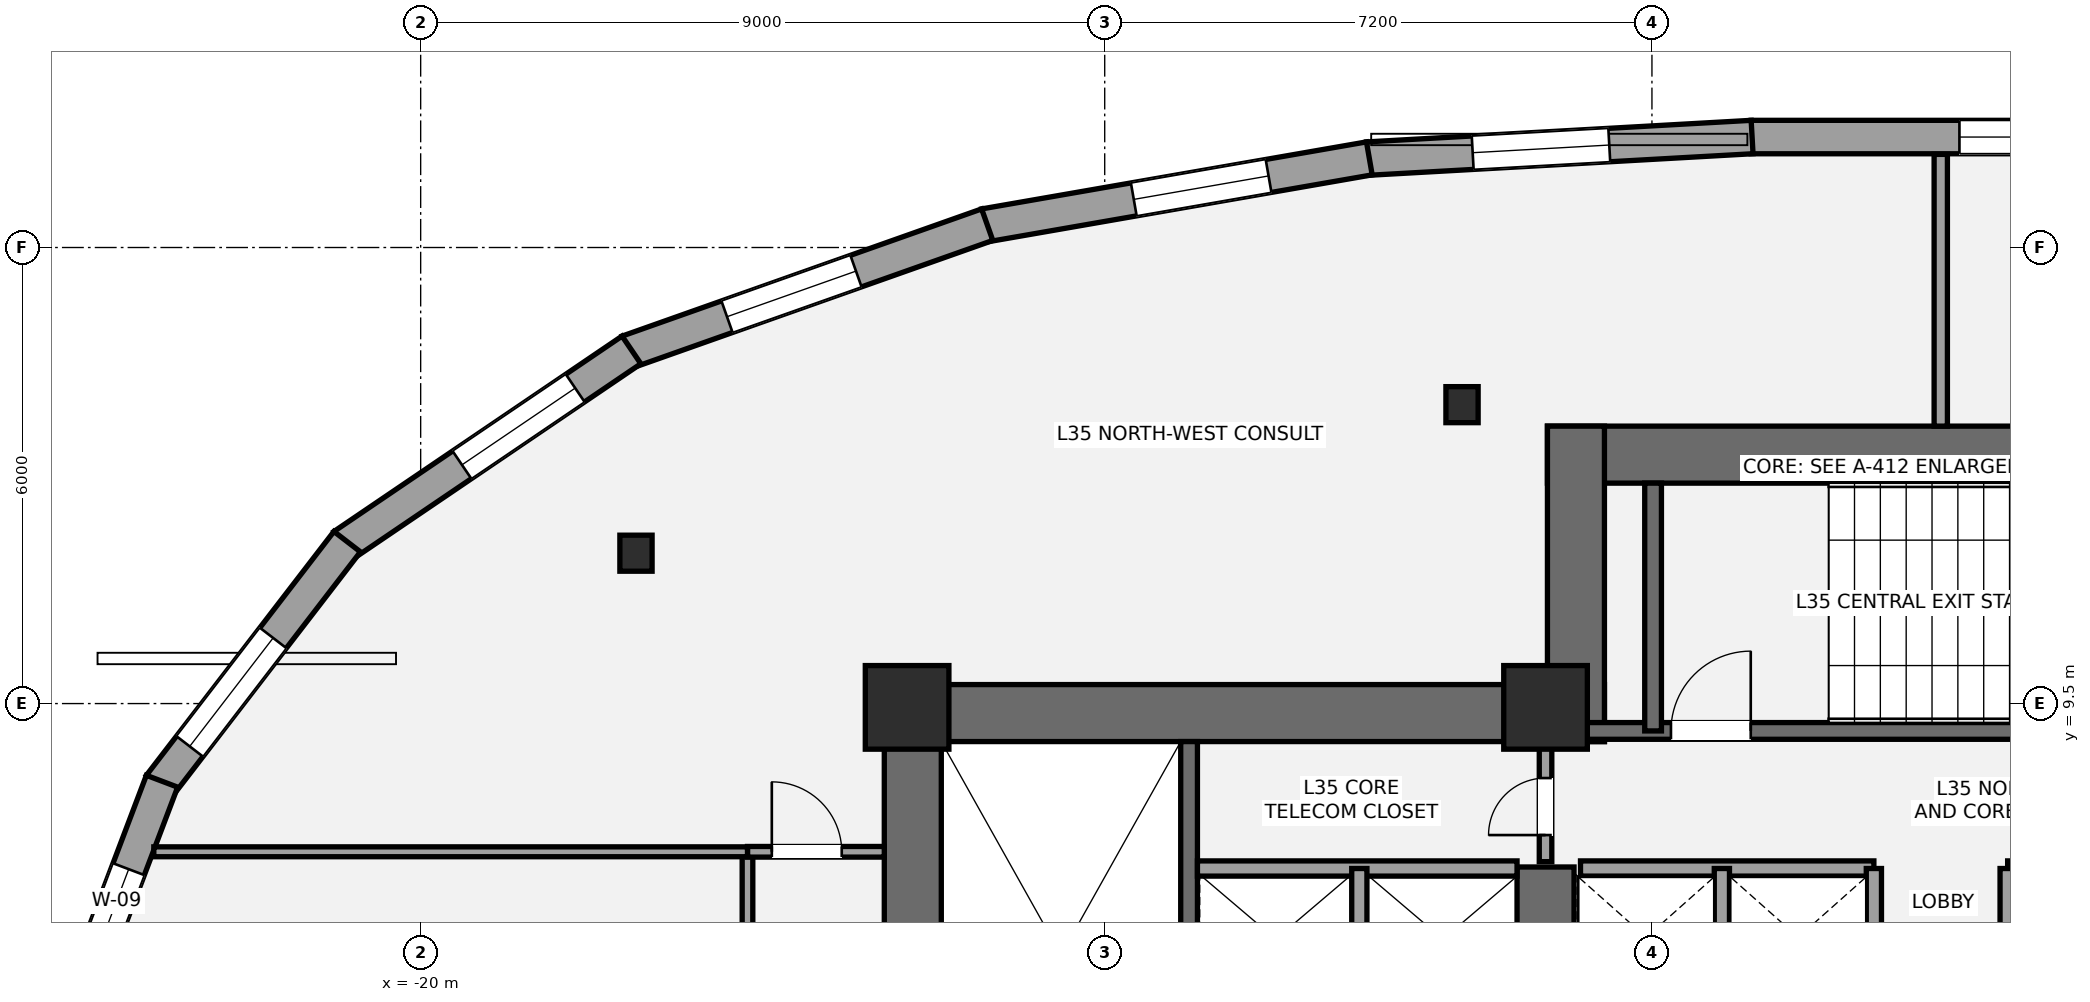
"""IFC4 building model, lengths in metres.
Left out: names, types, materials, properties, quantities, classifications, styles, units other than length and angle.
Written with IfcOpenShell. Run it as: python <this file> out.ifc"""

import sys

from ifc_helpers import new_model, si_unit, direction, frame, frame_2d, origin, origin_2d, place, context, subcontext, project, spatial, rectangle, i_section, extrude, element, fill, save


model = new_model("IFC4")
c1 = context("Model", 3, precision=1e-05, world=origin(), true_north=direction((0.0, 1.0)))
c2 = subcontext(c1, "Body", "Model", "MODEL_VIEW")
j1 = project(units=[si_unit("LENGTHUNIT", "METRE"), si_unit("PLANEANGLEUNIT", "RADIAN")], contexts=[c1])
p1 = place(None, origin())
s1 = spatial("IfcSite", under=j1, at=p1, CompositionType="ELEMENT")
p2 = place(p1, origin())
s2 = spatial("IfcBuilding", under=s1, at=p2, CompositionType="ELEMENT")
p3 = place(p2, frame((0.0, 0.0, 131.6)))
s3 = spatial("IfcBuildingStorey", under=s2, at=p3, CompositionType="ELEMENT", Elevation=131.6)
p4 = place(p3, frame((-13.525, 1.1, 0.0), z_axis=(0.0, 0.0, 1.0), x_axis=(0.0, 1.0, 0.0)))
e1 = element("IfcWall", 1, at=p4, inside=s3, PredefinedType="SHEAR", context=c2, shape_type="SweptSolid", body=[
    extrude(rectangle(XDim=8.65, YDim=0.75, at=frame_2d((4.325, 0.0))), origin(), (0.0, 0.0, 1.0), 3.5),
])
p5 = place(p3, frame((-13.9, 9.375, 0.0), z_axis=(0.0, 0.0, 1.0), x_axis=(1.0, 0.0, 0.0)))
e2 = element("IfcWall", 2, at=p5, inside=s3, PredefinedType="SHEAR", context=c2, shape_type="SweptSolid", body=[
    extrude(rectangle(XDim=9.475, YDim=0.75, at=frame_2d((4.737, 0.0))), origin(), (0.0, 0.0, 1.0), 3.5),
])
p6 = place(p3, frame((-5.2, 5.35, 0.0), z_axis=(0.0, 0.0, 1.0), x_axis=(0.0, 1.0, 0.0)))
e3 = element("IfcWall", 3, at=p6, inside=s3, PredefinedType="SHEAR", context=c2, shape_type="SweptSolid", body=[
    extrude(rectangle(XDim=2.0, YDim=0.75, at=frame_2d((1.0, 0.0))), origin(), (0.0, 0.0, 1.0), 3.5),
])
p7 = place(p3, frame((-9.89, 1.85, 0.0), z_axis=(0.0, 0.0, 1.0), x_axis=(0.0, 1.0, 0.0)))
e4 = element("IfcWall", 4, at=p7, inside=s3, PredefinedType="SHEAR", context=c2, shape_type="SweptSolid", body=[
    extrude(rectangle(XDim=7.15, YDim=0.22, at=frame_2d((3.575, 0.0))), origin(), (0.0, 0.0, 1.0), 3.5),
])
p8 = place(p3, frame((-5.175, 12.775, 0.0), z_axis=(0.0, 0.0, 1.0), x_axis=(1.0, 0.0, 0.0)))
e5 = element("IfcWall", 5, at=p8, inside=s3, PredefinedType="SHEAR", context=c2, shape_type="SweptSolid", body=[
    extrude(rectangle(XDim=10.35, YDim=0.75, at=frame_2d((5.175, 0.0))), origin(), (0.0, 0.0, 1.0), 3.5),
])
p9 = place(p3, frame((-4.8, 9.0, 0.0), z_axis=(0.0, 0.0, 1.0), x_axis=(0.0, 1.0, 0.0)))
e6 = element("IfcWall", 6, at=p9, inside=s3, PredefinedType="SHEAR", context=c2, shape_type="SweptSolid", body=[
    extrude(rectangle(XDim=4.15, YDim=0.75, at=frame_2d((2.075, 0.0))), origin(), (0.0, 0.0, 1.0), 3.5),
])
p10 = place(p3, frame((-4.7, 9.14, 0.0), z_axis=(0.0, 0.0, 1.0), x_axis=(1.0, 0.0, 0.0)))
e7 = element("IfcWall", 7, at=p10, inside=s3, PredefinedType="SHEAR", context=c2, shape_type="SweptSolid", body=[
    extrude(rectangle(XDim=9.3, YDim=0.22, at=frame_2d((4.65, 0.0))), origin(), (0.0, 0.0, 1.0), 3.5),
])
p11 = place(p10, frame((1.15, 0.0, 0.0)))
e8 = element("IfcOpeningElement", 8, at=p11, cuts=e7, PredefinedType="OPENING", context=c2, shape_type="SweptSolid", body=[
    extrude(rectangle(XDim=1.05, YDim=2.15, at=frame_2d((0.525, 1.075))), frame((0.0, 0.12, 0.0), z_axis=(0.0, -1.0, 0.0), x_axis=(1.0, 0.0, 0.0)), (0.0, 0.0, 1.0), 0.24),
])
p12 = place(p3, frame((-3.785, 9.14, 0.0), z_axis=(0.0, 0.0, 1.0), x_axis=(0.0, 1.0, 0.0)))
e9 = element("IfcWall", 9, at=p12, inside=s3, PredefinedType="SHEAR", context=c2, shape_type="SweptSolid", body=[
    extrude(rectangle(XDim=3.26, YDim=0.22, at=frame_2d((1.63, 0.0))), origin(), (0.0, 0.0, 1.0), 3.5),
])
for number, where, z_axis, x_axis in (
    (10, (-13.6, 9.45, 0.0), (0.0, 0.0, 1.0), (1.0, 0.0, 0.0)),
    (11, (-5.2, 9.45, 0.0), (0.0, 0.0, 1.0), (1.0, 0.0, 0.0)),
):
    element("IfcColumn", number, at=place(p3, frame(where, z_axis=z_axis, x_axis=x_axis)), inside=s3, PredefinedType="COLUMN", context=c2, shape_type="SweptSolid", body=[
        extrude(rectangle(XDim=1.1, YDim=1.1, at=origin_2d()), origin(), (0.0, 0.0, 1.0), 3.5),
    ])
for number, where, z_axis, x_axis in (
    (12, (-6.299, 13.433, 0.0), (0.0, 0.0, 1.0), (1.0, 0.0, 0.0)),
    (13, (-17.167, 11.478, 0.0), (0.0, 0.0, 1.0), (1.0, 0.0, 0.0)),
):
    element("IfcColumn", number, at=place(p3, frame(where, z_axis=z_axis, x_axis=x_axis)), inside=s3, PredefinedType="COLUMN", context=c2, shape_type="SweptSolid", body=[
        extrude(i_section(OverallWidth=0.424, OverallDepth=0.474, WebThickness=0.048, FlangeThickness=0.077, at=origin_2d()), origin(), (0.0, 0.0, 1.0), 3.5),
    ])
p13 = place(p3, frame((-2.495, 16.953, 0.0), z_axis=(0.0, 0.0, 1.0), x_axis=(1.0, 0.0, 0.0)))
e14 = element("IfcWall", 14, at=p13, inside=s3, PredefinedType="STANDARD", context=c2, shape_type="SweptSolid", body=[
    extrude(rectangle(XDim=4.989, YDim=0.44, at=frame_2d((2.495, 0.0))), origin(), (0.0, 0.0, 1.0), 2.482),
])
p14 = place(p13, frame((2.74, 0.0, 0.65)))
e15 = element("IfcOpeningElement", 15, at=p14, cuts=e14, PredefinedType="OPENING", context=c2, shape_type="SweptSolid", body=[
    extrude(rectangle(XDim=1.8, YDim=1.7, at=frame_2d((0.9, 0.85))), frame((0.0, 0.23, 0.0), z_axis=(0.0, -1.0, 0.0), x_axis=(1.0, 0.0, 0.0)), (0.0, 0.0, 1.0), 0.46),
])
p15 = place(p3, frame((-7.544, 16.669, 0.0), z_axis=(0.0, 0.0, 1.0), x_axis=(0.99842742965, 0.056059501621, 0.0)))
e16 = element("IfcWall", 16, at=p15, inside=s3, PredefinedType="STANDARD", context=c2, shape_type="SweptSolid", body=[
    extrude(rectangle(XDim=5.069, YDim=0.44, at=frame_2d((2.535, 0.0))), origin(), (0.0, 0.0, 1.0), 2.478),
])
p16 = place(p15, frame((1.387, 0.0, 0.65)))
e17 = element("IfcOpeningElement", 17, at=p16, cuts=e16, PredefinedType="OPENING", context=c2, shape_type="SweptSolid", body=[
    extrude(rectangle(XDim=1.8, YDim=1.7, at=frame_2d((0.9, 0.85))), frame((0.0, 0.23, 0.0), z_axis=(0.0, -1.0, 0.0), x_axis=(1.0, 0.0, 0.0)), (0.0, 0.0, 1.0), 0.46),
])
p17 = place(p3, frame((-12.582, 15.791, 0.0), z_axis=(0.0, 0.0, 1.0), x_axis=(0.985177916526, 0.171535631254, 0.0)))
e18 = element("IfcWall", 18, at=p17, inside=s3, PredefinedType="STANDARD", context=c2, shape_type="SweptSolid", body=[
    extrude(rectangle(XDim=5.139, YDim=0.44, at=frame_2d((2.57, 0.0))), origin(), (0.0, 0.0, 1.0), 2.478),
])
p18 = place(p17, frame((1.993, 0.0, 0.65)))
e19 = element("IfcOpeningElement", 19, at=p18, cuts=e18, PredefinedType="OPENING", context=c2, shape_type="SweptSolid", body=[
    extrude(rectangle(XDim=1.8, YDim=1.7, at=frame_2d((0.9, 0.85))), frame((0.0, 0.23, 0.0), z_axis=(0.0, -1.0, 0.0), x_axis=(1.0, 0.0, 0.0)), (0.0, 0.0, 1.0), 0.46),
])
p19 = place(p3, frame((-17.277, 14.127, 0.0), z_axis=(0.0, 0.0, 1.0), x_axis=(0.942780868171, 0.333413009061, 0.0)))
e20 = element("IfcWall", 20, at=p19, inside=s3, PredefinedType="STANDARD", context=c2, shape_type="SweptSolid", body=[
    extrude(rectangle(XDim=5.018, YDim=0.44, at=frame_2d((2.509, 0.0))), origin(), (0.0, 0.0, 1.0), 2.478),
])
p20 = place(p19, frame((1.387, 0.0, 0.65)))
e21 = element("IfcOpeningElement", 21, at=p20, cuts=e20, PredefinedType="OPENING", context=c2, shape_type="SweptSolid", body=[
    extrude(rectangle(XDim=1.8, YDim=1.7, at=frame_2d((0.9, 0.85))), frame((0.0, 0.23, 0.0), z_axis=(0.0, -1.0, 0.0), x_axis=(1.0, 0.0, 0.0)), (0.0, 0.0, 1.0), 0.46),
])
p21 = place(p3, frame((-21.018, 11.582, 0.0), z_axis=(0.0, 0.0, 1.0), x_axis=(0.827670311179, 0.561214625605, 0.0)))
e22 = element("IfcWall", 22, at=p21, inside=s3, PredefinedType="STANDARD", context=c2, shape_type="SweptSolid", body=[
    extrude(rectangle(XDim=4.58, YDim=0.44, at=frame_2d((2.29, 0.0))), origin(), (0.0, 0.0, 1.0), 2.482),
])
p22 = place(p21, frame((1.886, 0.0, 0.65)))
e23 = element("IfcOpeningElement", 23, at=p22, cuts=e22, PredefinedType="OPENING", context=c2, shape_type="SweptSolid", body=[
    extrude(rectangle(XDim=1.8, YDim=1.7, at=frame_2d((0.9, 0.85))), frame((0.0, 0.23, 0.0), z_axis=(0.0, -1.0, 0.0), x_axis=(1.0, 0.0, 0.0)), (0.0, 0.0, 1.0), 0.46),
])
p23 = place(p3, frame((-23.435, 8.422, 0.0), z_axis=(0.0, 0.0, 1.0), x_axis=(0.60975157382, 0.792592592839, 0.0)))
e24 = element("IfcWall", 24, at=p23, inside=s3, PredefinedType="STANDARD", context=c2, shape_type="SweptSolid", body=[
    extrude(rectangle(XDim=4.047, YDim=0.44, at=frame_2d((2.023, 0.0))), origin(), (0.0, 0.0, 1.0), 2.482),
])
p24 = place(p23, frame((0.649, 0.0, 0.65)))
e25 = element("IfcOpeningElement", 25, at=p24, cuts=e24, PredefinedType="OPENING", context=c2, shape_type="SweptSolid", body=[
    extrude(rectangle(XDim=1.8, YDim=1.7, at=frame_2d((0.9, 0.85))), frame((0.0, 0.23, 0.0), z_axis=(0.0, -1.0, 0.0), x_axis=(1.0, 0.0, 0.0)), (0.0, 0.0, 1.0), 0.46),
])
p25 = place(p3, frame((-24.704, 5.045, 0.0), z_axis=(0.0, 0.0, 1.0), x_axis=(0.354219131363, 0.935162449511, 0.0)))
e26 = element("IfcWall", 26, at=p25, inside=s3, PredefinedType="STANDARD", context=c2, shape_type="SweptSolid", body=[
    extrude(rectangle(XDim=3.671, YDim=0.44, at=frame_2d((1.835, 0.0))), origin(), (0.0, 0.0, 1.0), 2.478),
])
p26 = place(p25, frame((1.534, 0.0, 0.58)))
e27 = element("IfcOpeningElement", 27, at=p26, cuts=e26, PredefinedType="OPENING", context=c2, shape_type="SweptSolid", body=[
    extrude(rectangle(XDim=0.9, YDim=1.35, at=frame_2d((0.45, 0.675))), frame((0.0, 0.23, 0.0), z_axis=(0.0, -1.0, 0.0), x_axis=(1.0, 0.0, 0.0)), (0.0, 0.0, 1.0), 0.46),
])
p27 = place(p3, frame((-9.78, 7.33, 0.0), z_axis=(0.0, 0.0, 1.0), x_axis=(1.0, 0.0, 0.0)))
e28 = element("IfcWall", 28, at=p27, inside=s3, PredefinedType="SOLIDWALL", context=c2, shape_type="SweptSolid", body=[
    extrude(rectangle(XDim=4.205, YDim=0.2, at=frame_2d((2.103, 0.0))), origin(), (0.0, 0.0, 1.0), 3.26),
])
p28 = place(p3, frame((-7.65, 5.47, 0.0), z_axis=(0.0, 0.0, 1.0), x_axis=(0.0, 1.0, 0.0)))
e29 = element("IfcWall", 29, at=p28, inside=s3, PredefinedType="SOLIDWALL", context=c2, shape_type="SweptSolid", body=[
    extrude(rectangle(XDim=1.86, YDim=0.2, at=frame_2d((0.93, 0.0))), origin(), (0.0, 0.0, 1.0), 3.26),
])
for number, where, z_axis, x_axis in (
    (30, (-4.74, 7.33, 0.0), (0.0, 0.0, 1.0), (1.0, 0.0, 0.0)),
    (31, (0.88, 7.33, 0.0), (0.0, 0.0, 1.0), (1.0, 0.0, 0.0)),
):
    element("IfcWall", number, at=place(p3, frame(where, z_axis=z_axis, x_axis=x_axis)), inside=s3, PredefinedType="SOLIDWALL", context=c2, shape_type="SweptSolid", body=[
        extrude(rectangle(XDim=3.86, YDim=0.2, at=frame_2d((1.93, 0.0))), origin(), (0.0, 0.0, 1.0), 3.26),
    ])
for number, where, z_axis, x_axis in (
    (32, (-2.88, 5.52, 0.0), (0.0, 0.0, 1.0), (0.0, 1.0, 0.0)),
    (33, (-0.88, 5.52, 0.0), (0.0, 0.0, 1.0), (0.0, 1.0, 0.0)),
    (34, (0.88, 5.52, 0.0), (0.0, 0.0, 1.0), (0.0, 1.0, 0.0)),
):
    element("IfcWall", number, at=place(p3, frame(where, z_axis=z_axis, x_axis=x_axis)), inside=s3, PredefinedType="SOLIDWALL", context=c2, shape_type="SweptSolid", body=[
        extrude(rectangle(XDim=1.81, YDim=0.2, at=frame_2d((0.905, 0.0))), origin(), (0.0, 0.0, 1.0), 3.26),
    ])
p29 = place(p3, frame((-5.2, 7.42, 0.0), z_axis=(0.0, 0.0, 1.0), x_axis=(0.0, 1.0, 0.0)))
e35 = element("IfcWall", 35, at=p29, inside=s3, PredefinedType="PARTITIONING", context=c2, shape_type="SweptSolid", body=[
    extrude(rectangle(XDim=1.58, YDim=0.165, at=frame_2d((0.79, 0.0))), origin(), (0.0, 0.0, 1.0), 3.26),
])
p30 = place(p29, frame((0.35, 0.0, 0.0)))
e36 = element("IfcOpeningElement", 36, at=p30, cuts=e35, PredefinedType="OPENING", context=c2, shape_type="SweptSolid", body=[
    extrude(rectangle(XDim=0.75, YDim=2.1, at=frame_2d((0.375, 1.05))), frame((0.0, 0.093, 0.0), z_axis=(0.0, -1.0, 0.0), x_axis=(1.0, 0.0, 0.0)), (0.0, 0.0, 1.0), 0.185),
])
p31 = place(p3, frame((-15.7, -14.443, 0.0), z_axis=(0.0, 0.0, 1.0), x_axis=(0.0, 1.0, 0.0)))
e37 = element("IfcWall", 37, at=p31, inside=s3, PredefinedType="PARTITIONING", context=c2, shape_type="SweptSolid", body=[
    extrude(rectangle(XDim=21.993, YDim=0.14, at=frame_2d((10.997, 0.0))), origin(), (0.0, 0.0, 1.0), 2.713),
])
p32 = place(p31, frame((9.293, 0.0, 0.0)))
e38 = element("IfcOpeningElement", 38, at=p32, cuts=e37, PredefinedType="OPENING", context=c2, shape_type="SweptSolid", body=[
    extrude(rectangle(XDim=0.9, YDim=2.1, at=frame_2d((0.45, 1.05))), frame((0.0, 0.08, 0.0), z_axis=(0.0, -1.0, 0.0), x_axis=(1.0, 0.0, 0.0)), (0.0, 0.0, 1.0), 0.16),
])
p33 = place(p31, frame((14.393, 0.0, 0.0)))
e39 = element("IfcOpeningElement", 39, at=p33, cuts=e37, PredefinedType="OPENING", context=c2, shape_type="SweptSolid", body=[
    extrude(rectangle(XDim=0.9, YDim=2.1, at=frame_2d((0.45, 1.05))), frame((0.0, 0.08, 0.0), z_axis=(0.0, -1.0, 0.0), x_axis=(1.0, 0.0, 0.0)), (0.0, 0.0, 1.0), 0.16),
])
p34 = place(p31, frame((19.068, 0.0, 0.0)))
e40 = element("IfcOpeningElement", 40, at=p34, cuts=e37, PredefinedType="OPENING", context=c2, shape_type="SweptSolid", body=[
    extrude(rectangle(XDim=0.9, YDim=2.1, at=frame_2d((0.45, 1.05))), frame((0.0, 0.08, 0.0), z_axis=(0.0, -1.0, 0.0), x_axis=(1.0, 0.0, 0.0)), (0.0, 0.0, 1.0), 0.16),
])
p35 = place(p3, frame((-15.7, 7.55, 0.0), z_axis=(0.0, 0.0, 1.0), x_axis=(1.0, 0.0, 0.0)))
e41 = element("IfcWall", 41, at=p35, inside=s3, PredefinedType="PARTITIONING", context=c2, shape_type="SweptSolid", body=[
    extrude(rectangle(XDim=1.8, YDim=0.14, at=frame_2d((0.9, 0.0))), origin(), (0.0, 0.0, 1.0), 3.26),
])
p36 = place(p35, frame((0.32, 0.0, 0.0)))
e42 = element("IfcOpeningElement", 42, at=p36, cuts=e41, PredefinedType="OPENING", context=c2, shape_type="SweptSolid", body=[
    extrude(rectangle(XDim=0.92, YDim=2.15, at=frame_2d((0.46, 1.075))), frame((0.0, 0.08, 0.0), z_axis=(0.0, -1.0, 0.0), x_axis=(1.0, 0.0, 0.0)), (0.0, 0.0, 1.0), 0.16),
])
p37 = place(p3, frame((0.0, 13.15, 0.0), z_axis=(0.0, 0.0, 1.0), x_axis=(0.0, 1.0, 0.0)))
e43 = element("IfcWall", 43, at=p37, inside=s3, PredefinedType="PARTITIONING", context=c2, shape_type="SweptSolid", body=[
    extrude(rectangle(XDim=3.575, YDim=0.175, at=frame_2d((1.788, 0.0))), origin(), (0.0, 0.0, 1.0), 3.26),
])
p38 = place(p3, frame((-23.511, 7.55, 0.0), z_axis=(0.0, 0.0, 1.0), x_axis=(1.0, 0.0, 0.0)))
e44 = element("IfcWall", 44, at=p38, inside=s3, PredefinedType="PARTITIONING", context=c2, shape_type="SweptSolid", body=[
    extrude(rectangle(XDim=7.811, YDim=0.13, at=frame_2d((3.906, 0.0))), origin(), (0.0, 0.0, 1.0), 2.713),
])
p39 = place(p14, origin())
e45 = element("IfcWindow", 45, at=p39, inside=s3, PartitioningType="SINGLE_PANEL", PredefinedType="WINDOW", context=c2, shape_type="SweptSolid", body=[
    extrude(rectangle(XDim=1.8, YDim=1.7, at=frame_2d((0.9, 0.85))), frame((0.0, -0.01, 0.0), z_axis=(0.0, -1.0, 0.0), x_axis=(1.0, 0.0, 0.0)), (0.0, 0.0, 1.0), 0.06),
])
fill(e15, e45)
p40 = place(p16, origin())
e46 = element("IfcWindow", 46, at=p40, inside=s3, PartitioningType="SINGLE_PANEL", PredefinedType="WINDOW", context=c2, shape_type="SweptSolid", body=[
    extrude(rectangle(XDim=1.8, YDim=1.7, at=frame_2d((0.9, 0.85))), frame((0.0, -0.01, 0.0), z_axis=(0.0, -1.0, 0.0), x_axis=(1.0, 0.0, 0.0)), (0.0, 0.0, 1.0), 0.06),
])
fill(e17, e46)
p41 = place(p18, origin())
e47 = element("IfcWindow", 47, at=p41, inside=s3, PartitioningType="SINGLE_PANEL", PredefinedType="WINDOW", context=c2, shape_type="SweptSolid", body=[
    extrude(rectangle(XDim=1.8, YDim=1.7, at=frame_2d((0.9, 0.85))), frame((0.0, -0.01, 0.0), z_axis=(0.0, -1.0, 0.0), x_axis=(1.0, 0.0, 0.0)), (0.0, 0.0, 1.0), 0.06),
])
fill(e19, e47)
p42 = place(p20, origin())
e48 = element("IfcWindow", 48, at=p42, inside=s3, PartitioningType="SINGLE_PANEL", PredefinedType="WINDOW", context=c2, shape_type="SweptSolid", body=[
    extrude(rectangle(XDim=1.8, YDim=1.7, at=frame_2d((0.9, 0.85))), frame((0.0, -0.01, 0.0), z_axis=(0.0, -1.0, 0.0), x_axis=(1.0, 0.0, 0.0)), (0.0, 0.0, 1.0), 0.06),
])
fill(e21, e48)
p43 = place(p22, origin())
e49 = element("IfcWindow", 49, at=p43, inside=s3, PartitioningType="SINGLE_PANEL", PredefinedType="WINDOW", context=c2, shape_type="SweptSolid", body=[
    extrude(rectangle(XDim=1.8, YDim=1.7, at=frame_2d((0.9, 0.85))), frame((0.0, -0.01, 0.0), z_axis=(0.0, -1.0, 0.0), x_axis=(1.0, 0.0, 0.0)), (0.0, 0.0, 1.0), 0.06),
])
fill(e23, e49)
p44 = place(p24, origin())
e50 = element("IfcWindow", 50, at=p44, inside=s3, PartitioningType="SINGLE_PANEL", PredefinedType="WINDOW", context=c2, shape_type="SweptSolid", body=[
    extrude(rectangle(XDim=1.8, YDim=1.7, at=frame_2d((0.9, 0.85))), frame((0.0, -0.01, 0.0), z_axis=(0.0, -1.0, 0.0), x_axis=(1.0, 0.0, 0.0)), (0.0, 0.0, 1.0), 0.06),
])
fill(e25, e50)
p45 = place(p26, origin())
e51 = element("IfcWindow", 51, at=p45, inside=s3, PartitioningType="SINGLE_PANEL", PredefinedType="WINDOW", context=c2, shape_type="SweptSolid", body=[
    extrude(rectangle(XDim=0.9, YDim=1.35, at=frame_2d((0.45, 0.675))), frame((0.0, -0.01, 0.0), z_axis=(0.0, -1.0, 0.0), x_axis=(1.0, 0.0, 0.0)), (0.0, 0.0, 1.0), 0.06),
])
fill(e27, e51)
p46 = place(p11, origin())
e52 = element("IfcDoor", 52, at=p46, inside=s3, OperationType="SINGLE_SWING_RIGHT", PredefinedType="DOOR", context=c2, shape_type="SweptSolid", body=[
    extrude(rectangle(XDim=1.05, YDim=2.15, at=frame_2d((0.525, 1.075))), frame((0.0, 0.025, 0.0), z_axis=(0.0, -1.0, 0.0), x_axis=(1.0, 0.0, 0.0)), (0.0, 0.0, 1.0), 0.05),
])
fill(e8, e52)
p47 = place(p30, origin())
e53 = element("IfcDoor", 53, at=p47, inside=s3, OperationType="SINGLE_SWING_LEFT", PredefinedType="DOOR", context=c2, shape_type="SweptSolid", body=[
    extrude(rectangle(XDim=0.75, YDim=2.1, at=frame_2d((0.375, 1.05))), frame((0.0, 0.025, 0.0), z_axis=(0.0, -1.0, 0.0), x_axis=(1.0, 0.0, 0.0)), (0.0, 0.0, 1.0), 0.05),
])
fill(e36, e53)
p48 = place(p36, origin())
e54 = element("IfcDoor", 54, at=p48, inside=s3, OperationType="SINGLE_SWING_LEFT", PredefinedType="DOOR", context=c2, shape_type="SweptSolid", body=[
    extrude(rectangle(XDim=0.92, YDim=2.15, at=frame_2d((0.46, 1.075))), frame((0.0, 0.025, 0.0), z_axis=(0.0, -1.0, 0.0), x_axis=(1.0, 0.0, 0.0)), (0.0, 0.0, 1.0), 0.05),
])
fill(e42, e54)
save(model, sys.argv[1])
